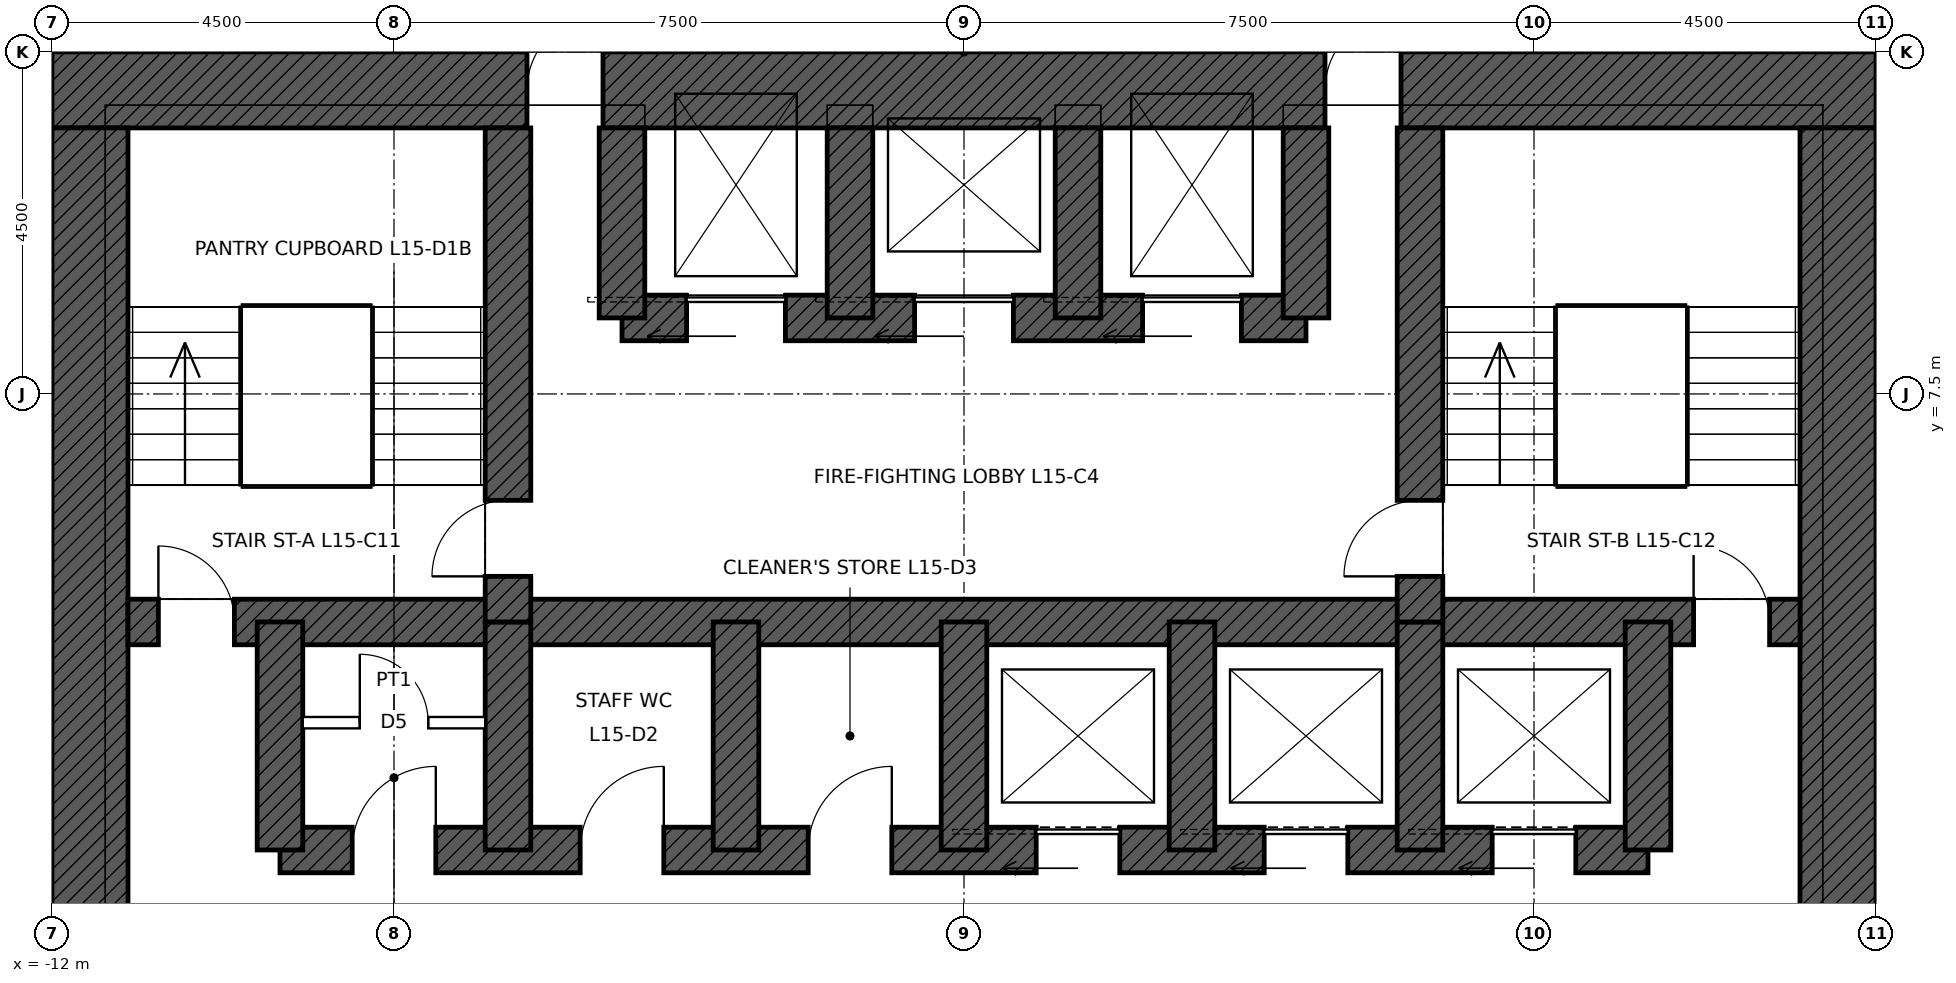
"""IFC4 building model, lengths in metres.
Left out: names, types, materials, properties, quantities, classifications, styles, units other than length and angle.
Written with IfcOpenShell. Run it as: python <this file> out.ifc"""

import sys

from ifc_helpers import new_model, si_unit, direction, frame, frame_2d, origin, place, context, subcontext, project, spatial, rectangle, extrude, element, fill, save


model = new_model("IFC4")
c1 = context("Model", 3, precision=1e-05, world=origin(), true_north=direction((0.0, 1.0)))
c2 = subcontext(c1, "Body", "Model", "MODEL_VIEW")
j1 = project(units=[si_unit("LENGTHUNIT", "METRE"), si_unit("PLANEANGLEUNIT", "RADIAN")], contexts=[c1])
p1 = place(None, origin())
s1 = spatial("IfcSite", under=j1, at=p1, CompositionType="ELEMENT")
p2 = place(p1, origin())
s2 = spatial("IfcBuilding", under=s1, at=p2, CompositionType="ELEMENT")
p3 = place(p2, frame((0.0, 0.0, 78.4)))
s3 = spatial("IfcBuildingStorey", under=s2, at=p3, CompositionType="ELEMENT", Elevation=78.4)
p4 = place(p3, frame((-12.0, 11.5, 0.0), z_axis=(0.0, 0.0, 1.0), x_axis=(1.0, 0.0, 0.0)))
e1 = element("IfcWall", 1, at=p4, inside=s3, PredefinedType="SHEAR", context=c2, shape_type="SweptSolid", body=[
    extrude(rectangle(XDim=24.0, YDim=1.0, at=frame_2d((12.0, 0.0))), origin(), (0.0, 0.0, 1.0), 5.0),
])
p5 = place(p4, frame((6.25, 0.0, 0.0)))
e2 = element("IfcOpeningElement", 2, at=p5, cuts=e1, PredefinedType="OPENING", context=c2, shape_type="SweptSolid", body=[
    extrude(rectangle(XDim=1.0, YDim=2.4, at=frame_2d((0.5, 1.2))), frame((0.0, 0.51, 0.0), z_axis=(0.0, -1.0, 0.0), x_axis=(1.0, 0.0, 0.0)), (0.0, 0.0, 1.0), 1.02),
])
p6 = place(p4, frame((16.75, 0.0, 0.0)))
e3 = element("IfcOpeningElement", 3, at=p6, cuts=e1, PredefinedType="OPENING", context=c2, shape_type="SweptSolid", body=[
    extrude(rectangle(XDim=1.0, YDim=2.4, at=frame_2d((0.5, 1.2))), frame((0.0, 0.51, 0.0), z_axis=(0.0, -1.0, 0.0), x_axis=(1.0, 0.0, 0.0)), (0.0, 0.0, 1.0), 1.02),
])
p7 = place(p3, frame((11.5, 11.0, 0.0), z_axis=(0.0, 0.0, 1.0), x_axis=(0.0, -1.0, 0.0)))
e4 = element("IfcWall", 4, at=p7, inside=s3, PredefinedType="SHEAR", context=c2, shape_type="SweptSolid", body=[
    extrude(rectangle(XDim=22.0, YDim=1.0, at=frame_2d((11.0, 0.0))), origin(), (0.0, 0.0, 1.0), 5.0),
])
p8 = place(p7, frame((10.5, 0.0, 0.0)))
e5 = element("IfcOpeningElement", 5, at=p8, cuts=e4, PredefinedType="OPENING", context=c2, shape_type="SweptSolid", body=[
    extrude(rectangle(XDim=1.0, YDim=2.4, at=frame_2d((0.5, 1.2))), frame((0.0, 0.51, 0.0), z_axis=(0.0, -1.0, 0.0), x_axis=(1.0, 0.0, 0.0)), (0.0, 0.0, 1.0), 1.02),
])
p9 = place(p3, frame((-11.5, -11.0, 0.0), z_axis=(0.0, 0.0, 1.0), x_axis=(0.0, 1.0, 0.0)))
e6 = element("IfcWall", 6, at=p9, inside=s3, PredefinedType="SHEAR", context=c2, shape_type="SweptSolid", body=[
    extrude(rectangle(XDim=22.0, YDim=1.0, at=frame_2d((11.0, 0.0))), origin(), (0.0, 0.0, 1.0), 5.0),
])
p10 = place(p9, frame((10.5, 0.0, 0.0)))
e7 = element("IfcOpeningElement", 7, at=p10, cuts=e6, PredefinedType="OPENING", context=c2, shape_type="SweptSolid", body=[
    extrude(rectangle(XDim=1.0, YDim=2.4, at=frame_2d((0.5, 1.2))), frame((0.0, 0.51, 0.0), z_axis=(0.0, -1.0, 0.0), x_axis=(1.0, 0.0, 0.0)), (0.0, 0.0, 1.0), 1.02),
])
p11 = place(p3, frame((-11.0, 4.5, 0.0), z_axis=(0.0, 0.0, 1.0), x_axis=(1.0, 0.0, 0.0)))
e8 = element("IfcWall", 8, at=p11, inside=s3, PredefinedType="SHEAR", context=c2, shape_type="SweptSolid", body=[
    extrude(rectangle(XDim=22.0, YDim=0.6, at=frame_2d((11.0, 0.0))), origin(), (0.0, 0.0, 1.0), 5.0),
])
p12 = place(p11, frame((0.4, 0.0, 0.0)))
e9 = element("IfcOpeningElement", 9, at=p12, cuts=e8, PredefinedType="OPENING", context=c2, shape_type="SweptSolid", body=[
    extrude(rectangle(XDim=1.0, YDim=2.1, at=frame_2d((0.5, 1.05))), frame((0.0, 0.31, 0.0), z_axis=(0.0, -1.0, 0.0), x_axis=(1.0, 0.0, 0.0)), (0.0, 0.0, 1.0), 0.62),
])
p13 = place(p11, frame((20.6, 0.0, 0.0)))
e10 = element("IfcOpeningElement", 10, at=p13, cuts=e8, PredefinedType="OPENING", context=c2, shape_type="SweptSolid", body=[
    extrude(rectangle(XDim=1.0, YDim=2.1, at=frame_2d((0.5, 1.05))), frame((0.0, 0.31, 0.0), z_axis=(0.0, -1.0, 0.0), x_axis=(1.0, 0.0, 0.0)), (0.0, 0.0, 1.0), 0.62),
])
p14 = place(p3, frame((-9.0, 1.5, 0.0), z_axis=(0.0, 0.0, 1.0), x_axis=(1.0, 0.0, 0.0)))
e11 = element("IfcWall", 11, at=p14, inside=s3, PredefinedType="SHEAR", context=c2, shape_type="SweptSolid", body=[
    extrude(rectangle(XDim=18.0, YDim=0.6, at=frame_2d((9.0, 0.0))), origin(), (0.0, 0.0, 1.0), 5.0),
])
p15 = place(p14, frame((9.95, 0.0, 0.0)))
e12 = element("IfcOpeningElement", 12, at=p15, cuts=e11, PredefinedType="OPENING", context=c2, shape_type="SweptSolid", body=[
    extrude(rectangle(XDim=1.1, YDim=2.1, at=frame_2d((0.55, 1.05))), frame((0.0, 0.31, 0.0), z_axis=(0.0, -1.0, 0.0), x_axis=(1.0, 0.0, 0.0)), (0.0, 0.0, 1.0), 0.62),
])
p16 = place(p14, frame((12.95, 0.0, 0.0)))
e13 = element("IfcOpeningElement", 13, at=p16, cuts=e11, PredefinedType="OPENING", context=c2, shape_type="SweptSolid", body=[
    extrude(rectangle(XDim=1.1, YDim=2.1, at=frame_2d((0.55, 1.05))), frame((0.0, 0.31, 0.0), z_axis=(0.0, -1.0, 0.0), x_axis=(1.0, 0.0, 0.0)), (0.0, 0.0, 1.0), 0.62),
])
p17 = place(p14, frame((15.95, 0.0, 0.0)))
e14 = element("IfcOpeningElement", 14, at=p17, cuts=e11, PredefinedType="OPENING", context=c2, shape_type="SweptSolid", body=[
    extrude(rectangle(XDim=1.1, YDim=2.1, at=frame_2d((0.55, 1.05))), frame((0.0, 0.31, 0.0), z_axis=(0.0, -1.0, 0.0), x_axis=(1.0, 0.0, 0.0)), (0.0, 0.0, 1.0), 0.62),
])
p18 = place(p14, frame((0.95, 0.0, 0.0)))
e15 = element("IfcOpeningElement", 15, at=p18, cuts=e11, PredefinedType="OPENING", context=c2, shape_type="SweptSolid", body=[
    extrude(rectangle(XDim=1.1, YDim=2.1, at=frame_2d((0.55, 1.05))), frame((0.0, 0.31, 0.0), z_axis=(0.0, -1.0, 0.0), x_axis=(1.0, 0.0, 0.0)), (0.0, 0.0, 1.0), 0.62),
])
p19 = place(p14, frame((3.95, 0.0, 0.0)))
e16 = element("IfcOpeningElement", 16, at=p19, cuts=e11, PredefinedType="OPENING", context=c2, shape_type="SweptSolid", body=[
    extrude(rectangle(XDim=1.1, YDim=2.1, at=frame_2d((0.55, 1.05))), frame((0.0, 0.31, 0.0), z_axis=(0.0, -1.0, 0.0), x_axis=(1.0, 0.0, 0.0)), (0.0, 0.0, 1.0), 0.62),
])
p20 = place(p14, frame((6.95, 0.0, 0.0)))
e17 = element("IfcOpeningElement", 17, at=p20, cuts=e11, PredefinedType="OPENING", context=c2, shape_type="SweptSolid", body=[
    extrude(rectangle(XDim=1.1, YDim=2.1, at=frame_2d((0.55, 1.05))), frame((0.0, 0.31, 0.0), z_axis=(0.0, -1.0, 0.0), x_axis=(1.0, 0.0, 0.0)), (0.0, 0.0, 1.0), 0.62),
])
p21 = place(p3, frame((-4.5, 8.5, 0.0), z_axis=(0.0, 0.0, 1.0), x_axis=(1.0, 0.0, 0.0)))
e18 = element("IfcWall", 18, at=p21, inside=s3, PredefinedType="SHEAR", context=c2, shape_type="SweptSolid", body=[
    extrude(rectangle(XDim=9.0, YDim=0.6, at=frame_2d((4.5, 0.0))), origin(), (0.0, 0.0, 1.0), 5.0),
])
p22 = place(p21, frame((0.85, 0.0, 0.0)))
e19 = element("IfcOpeningElement", 19, at=p22, cuts=e18, PredefinedType="OPENING", context=c2, shape_type="SweptSolid", body=[
    extrude(rectangle(XDim=1.3, YDim=2.4, at=frame_2d((0.65, 1.2))), frame((0.0, 0.31, 0.0), z_axis=(0.0, -1.0, 0.0), x_axis=(1.0, 0.0, 0.0)), (0.0, 0.0, 1.0), 0.62),
])
p23 = place(p21, frame((6.85, 0.0, 0.0)))
e20 = element("IfcOpeningElement", 20, at=p23, cuts=e18, PredefinedType="OPENING", context=c2, shape_type="SweptSolid", body=[
    extrude(rectangle(XDim=1.3, YDim=2.4, at=frame_2d((0.65, 1.2))), frame((0.0, 0.31, 0.0), z_axis=(0.0, -1.0, 0.0), x_axis=(1.0, 0.0, 0.0)), (0.0, 0.0, 1.0), 0.62),
])
p24 = place(p21, frame((3.85, 0.0, 0.0)))
e21 = element("IfcOpeningElement", 21, at=p24, cuts=e18, PredefinedType="OPENING", context=c2, shape_type="SweptSolid", body=[
    extrude(rectangle(XDim=1.3, YDim=2.4, at=frame_2d((0.65, 1.2))), frame((0.0, 0.31, 0.0), z_axis=(0.0, -1.0, 0.0), x_axis=(1.0, 0.0, 0.0)), (0.0, 0.0, 1.0), 0.62),
])
for number, where, z_axis, x_axis in (
    (22, (-9.0, 1.5, 0.0), (0.0, 0.0, 1.0), (0.0, 1.0, 0.0)),
    (23, (9.0, 1.5, 0.0), (0.0, 0.0, 1.0), (0.0, 1.0, 0.0)),
    (24, (-6.0, 1.5, 0.0), (0.0, 0.0, 1.0), (0.0, 1.0, 0.0)),
    (25, (-3.0, 1.5, 0.0), (0.0, 0.0, 1.0), (0.0, 1.0, 0.0)),
    (26, (0.0, 1.5, 0.0), (0.0, 0.0, 1.0), (0.0, 1.0, 0.0)),
    (27, (3.0, 1.5, 0.0), (0.0, 0.0, 1.0), (0.0, 1.0, 0.0)),
    (28, (6.0, 1.5, 0.0), (0.0, 0.0, 1.0), (0.0, 1.0, 0.0)),
):
    element("IfcWall", number, at=place(p3, frame(where, z_axis=z_axis, x_axis=x_axis)), inside=s3, PredefinedType="SHEAR", context=c2, shape_type="SweptSolid", body=[
        extrude(rectangle(XDim=3.0, YDim=0.6, at=frame_2d((1.5, 0.0))), origin(), (0.0, 0.0, 1.0), 5.0),
    ])
p25 = place(p3, frame((-6.0, 4.5, 0.0), z_axis=(0.0, 0.0, 1.0), x_axis=(0.0, 1.0, 0.0)))
e29 = element("IfcWall", 29, at=p25, inside=s3, PredefinedType="SHEAR", context=c2, shape_type="SweptSolid", body=[
    extrude(rectangle(XDim=6.5, YDim=0.6, at=frame_2d((3.25, 0.0))), origin(), (0.0, 0.0, 1.0), 5.0),
])
p26 = place(p25, frame((0.6, 0.0, 0.0)))
e30 = element("IfcOpeningElement", 30, at=p26, cuts=e29, PredefinedType="OPENING", context=c2, shape_type="SweptSolid", body=[
    extrude(rectangle(XDim=1.0, YDim=2.1, at=frame_2d((0.5, 1.05))), frame((0.0, 0.31, 0.0), z_axis=(0.0, -1.0, 0.0), x_axis=(1.0, 0.0, 0.0)), (0.0, 0.0, 1.0), 0.62),
])
p27 = place(p3, frame((6.0, 4.5, 0.0), z_axis=(0.0, 0.0, 1.0), x_axis=(0.0, 1.0, 0.0)))
e31 = element("IfcWall", 31, at=p27, inside=s3, PredefinedType="SHEAR", context=c2, shape_type="SweptSolid", body=[
    extrude(rectangle(XDim=6.5, YDim=0.6, at=frame_2d((3.25, 0.0))), origin(), (0.0, 0.0, 1.0), 5.0),
])
p28 = place(p27, frame((0.6, 0.0, 0.0)))
e32 = element("IfcOpeningElement", 32, at=p28, cuts=e31, PredefinedType="OPENING", context=c2, shape_type="SweptSolid", body=[
    extrude(rectangle(XDim=1.0, YDim=2.1, at=frame_2d((0.5, 1.05))), frame((0.0, 0.31, 0.0), z_axis=(0.0, -1.0, 0.0), x_axis=(1.0, 0.0, 0.0)), (0.0, 0.0, 1.0), 0.62),
])
for number, where, z_axis, x_axis in (
    (33, (-4.5, 8.5, 0.0), (0.0, 0.0, 1.0), (0.0, 1.0, 0.0)),
    (34, (4.5, 8.5, 0.0), (0.0, 0.0, 1.0), (0.0, 1.0, 0.0)),
    (35, (-1.5, 8.5, 0.0), (0.0, 0.0, 1.0), (0.0, 1.0, 0.0)),
    (36, (1.5, 8.5, 0.0), (0.0, 0.0, 1.0), (0.0, 1.0, 0.0)),
):
    element("IfcWall", number, at=place(p3, frame(where, z_axis=z_axis, x_axis=x_axis)), inside=s3, PredefinedType="SHEAR", context=c2, shape_type="SweptSolid", body=[
        extrude(rectangle(XDim=2.5, YDim=0.6, at=frame_2d((1.25, 0.0))), origin(), (0.0, 0.0, 1.0), 5.0),
    ])
p29 = place(p3, frame((-8.7, 3.175, 0.0), z_axis=(0.0, 0.0, 1.0), x_axis=(1.0, 0.0, 0.0)))
e37 = element("IfcWall", 37, at=p29, inside=s3, PredefinedType="PARTITIONING", context=c2, shape_type="SweptSolid", body=[
    extrude(rectangle(XDim=2.4, YDim=0.15, at=frame_2d((1.2, 0.0))), origin(), (0.0, 0.0, 1.0), 4.75),
])
p30 = place(p29, frame((0.75, 0.0, 0.0)))
e38 = element("IfcOpeningElement", 38, at=p30, cuts=e37, PredefinedType="OPENING", context=c2, shape_type="SweptSolid", body=[
    extrude(rectangle(XDim=0.9, YDim=2.1, at=frame_2d((0.45, 1.05))), frame((0.0, 0.085, 0.0), z_axis=(0.0, -1.0, 0.0), x_axis=(1.0, 0.0, 0.0)), (0.0, 0.0, 1.0), 0.17),
])
p31 = place(p12, origin())
e39 = element("IfcDoor", 39, at=p31, inside=s3, OperationType="SINGLE_SWING_LEFT", PredefinedType="DOOR", context=c2, shape_type="SweptSolid", body=[
    extrude(rectangle(XDim=1.0, YDim=2.1, at=frame_2d((0.5, 1.05))), frame((0.0, 0.025, 0.0), z_axis=(0.0, -1.0, 0.0), x_axis=(1.0, 0.0, 0.0)), (0.0, 0.0, 1.0), 0.05),
])
fill(e9, e39)
p32 = place(p13, origin())
e40 = element("IfcDoor", 40, at=p32, inside=s3, OperationType="SINGLE_SWING_LEFT", PredefinedType="DOOR", context=c2, shape_type="SweptSolid", body=[
    extrude(rectangle(XDim=1.0, YDim=2.1, at=frame_2d((0.5, 1.05))), frame((0.0, 0.025, 0.0), z_axis=(0.0, -1.0, 0.0), x_axis=(1.0, 0.0, 0.0)), (0.0, 0.0, 1.0), 0.05),
])
fill(e10, e40)
p33 = place(p26, origin())
e41 = element("IfcDoor", 41, at=p33, inside=s3, OperationType="SINGLE_SWING_LEFT", PredefinedType="DOOR", context=c2, shape_type="SweptSolid", body=[
    extrude(rectangle(XDim=1.0, YDim=2.1, at=frame_2d((0.5, 1.05))), frame((0.0, 0.025, 0.0), z_axis=(0.0, -1.0, 0.0), x_axis=(1.0, 0.0, 0.0)), (0.0, 0.0, 1.0), 0.05),
])
fill(e30, e41)
p34 = place(p28, origin())
e42 = element("IfcDoor", 42, at=p34, inside=s3, OperationType="SINGLE_SWING_LEFT", PredefinedType="DOOR", context=c2, shape_type="SweptSolid", body=[
    extrude(rectangle(XDim=1.0, YDim=2.1, at=frame_2d((0.5, 1.05))), frame((0.0, 0.025, 0.0), z_axis=(0.0, -1.0, 0.0), x_axis=(1.0, 0.0, 0.0)), (0.0, 0.0, 1.0), 0.05),
])
fill(e32, e42)
p35 = place(p5, origin())
e43 = element("IfcDoor", 43, at=p35, inside=s3, OperationType="SINGLE_SWING_RIGHT", PredefinedType="DOOR", context=c2, shape_type="SweptSolid", body=[
    extrude(rectangle(XDim=1.0, YDim=2.4, at=frame_2d((0.5, 1.2))), frame((0.0, 0.485, 0.0), z_axis=(0.0, -1.0, 0.0), x_axis=(1.0, 0.0, 0.0)), (0.0, 0.0, 1.0), 0.05),
])
fill(e2, e43)
p36 = place(p6, origin())
e44 = element("IfcDoor", 44, at=p36, inside=s3, OperationType="SINGLE_SWING_RIGHT", PredefinedType="DOOR", context=c2, shape_type="SweptSolid", body=[
    extrude(rectangle(XDim=1.0, YDim=2.4, at=frame_2d((0.5, 1.2))), frame((0.0, 0.485, 0.0), z_axis=(0.0, -1.0, 0.0), x_axis=(1.0, 0.0, 0.0)), (0.0, 0.0, 1.0), 0.05),
])
fill(e3, e44)
p37 = place(p22, origin())
e45 = element("IfcDoor", 45, at=p37, inside=s3, OperationType="SLIDING_TO_LEFT", PredefinedType="DOOR", context=c2, shape_type="SweptSolid", body=[
    extrude(rectangle(XDim=1.3, YDim=2.4, at=frame_2d((0.65, 1.2))), frame((0.0, 0.025, 0.0), z_axis=(0.0, -1.0, 0.0), x_axis=(1.0, 0.0, 0.0)), (0.0, 0.0, 1.0), 0.05),
])
fill(e19, e45)
p38 = place(p23, origin())
e46 = element("IfcDoor", 46, at=p38, inside=s3, OperationType="SLIDING_TO_LEFT", PredefinedType="DOOR", context=c2, shape_type="SweptSolid", body=[
    extrude(rectangle(XDim=1.3, YDim=2.4, at=frame_2d((0.65, 1.2))), frame((0.0, 0.025, 0.0), z_axis=(0.0, -1.0, 0.0), x_axis=(1.0, 0.0, 0.0)), (0.0, 0.0, 1.0), 0.05),
])
fill(e20, e46)
p39 = place(p24, origin())
e47 = element("IfcDoor", 47, at=p39, inside=s3, OperationType="SLIDING_TO_LEFT", PredefinedType="DOOR", context=c2, shape_type="SweptSolid", body=[
    extrude(rectangle(XDim=1.3, YDim=2.4, at=frame_2d((0.65, 1.2))), frame((0.0, 0.025, 0.0), z_axis=(0.0, -1.0, 0.0), x_axis=(1.0, 0.0, 0.0)), (0.0, 0.0, 1.0), 0.05),
])
fill(e21, e47)
p40 = place(p15, origin())
e48 = element("IfcDoor", 48, at=p40, inside=s3, OperationType="SLIDING_TO_LEFT", PredefinedType="DOOR", context=c2, shape_type="SweptSolid", body=[
    extrude(rectangle(XDim=1.1, YDim=2.1, at=frame_2d((0.55, 1.05))), frame((0.0, 0.025, 0.0), z_axis=(0.0, -1.0, 0.0), x_axis=(1.0, 0.0, 0.0)), (0.0, 0.0, 1.0), 0.05),
])
fill(e12, e48)
p41 = place(p16, origin())
e49 = element("IfcDoor", 49, at=p41, inside=s3, OperationType="SLIDING_TO_LEFT", PredefinedType="DOOR", context=c2, shape_type="SweptSolid", body=[
    extrude(rectangle(XDim=1.1, YDim=2.1, at=frame_2d((0.55, 1.05))), frame((0.0, 0.025, 0.0), z_axis=(0.0, -1.0, 0.0), x_axis=(1.0, 0.0, 0.0)), (0.0, 0.0, 1.0), 0.05),
])
fill(e13, e49)
p42 = place(p17, origin())
e50 = element("IfcDoor", 50, at=p42, inside=s3, OperationType="SLIDING_TO_LEFT", PredefinedType="DOOR", context=c2, shape_type="SweptSolid", body=[
    extrude(rectangle(XDim=1.1, YDim=2.1, at=frame_2d((0.55, 1.05))), frame((0.0, 0.025, 0.0), z_axis=(0.0, -1.0, 0.0), x_axis=(1.0, 0.0, 0.0)), (0.0, 0.0, 1.0), 0.05),
])
fill(e14, e50)
p43 = place(p18, origin())
e51 = element("IfcDoor", 51, at=p43, inside=s3, OperationType="SINGLE_SWING_RIGHT", PredefinedType="DOOR", context=c2, shape_type="SweptSolid", body=[
    extrude(rectangle(XDim=1.1, YDim=2.1, at=frame_2d((0.55, 1.05))), frame((0.0, 0.025, 0.0), z_axis=(0.0, -1.0, 0.0), x_axis=(1.0, 0.0, 0.0)), (0.0, 0.0, 1.0), 0.05),
])
fill(e15, e51)
p44 = place(p30, origin())
e52 = element("IfcDoor", 52, at=p44, inside=s3, OperationType="SINGLE_SWING_LEFT", PredefinedType="DOOR", context=c2, shape_type="SweptSolid", body=[
    extrude(rectangle(XDim=0.9, YDim=2.1, at=frame_2d((0.45, 1.05))), frame((0.0, 0.025, 0.0), z_axis=(0.0, -1.0, 0.0), x_axis=(1.0, 0.0, 0.0)), (0.0, 0.0, 1.0), 0.05),
])
fill(e38, e52)
p45 = place(p19, origin())
e53 = element("IfcDoor", 53, at=p45, inside=s3, OperationType="SINGLE_SWING_RIGHT", PredefinedType="DOOR", context=c2, shape_type="SweptSolid", body=[
    extrude(rectangle(XDim=1.1, YDim=2.1, at=frame_2d((0.55, 1.05))), frame((0.0, 0.025, 0.0), z_axis=(0.0, -1.0, 0.0), x_axis=(1.0, 0.0, 0.0)), (0.0, 0.0, 1.0), 0.05),
])
fill(e16, e53)
p46 = place(p20, origin())
e54 = element("IfcDoor", 54, at=p46, inside=s3, OperationType="SINGLE_SWING_RIGHT", PredefinedType="DOOR", context=c2, shape_type="SweptSolid", body=[
    extrude(rectangle(XDim=1.1, YDim=2.1, at=frame_2d((0.55, 1.05))), frame((0.0, 0.025, 0.0), z_axis=(0.0, -1.0, 0.0), x_axis=(1.0, 0.0, 0.0)), (0.0, 0.0, 1.0), 0.05),
])
fill(e17, e54)
save(model, sys.argv[1])
